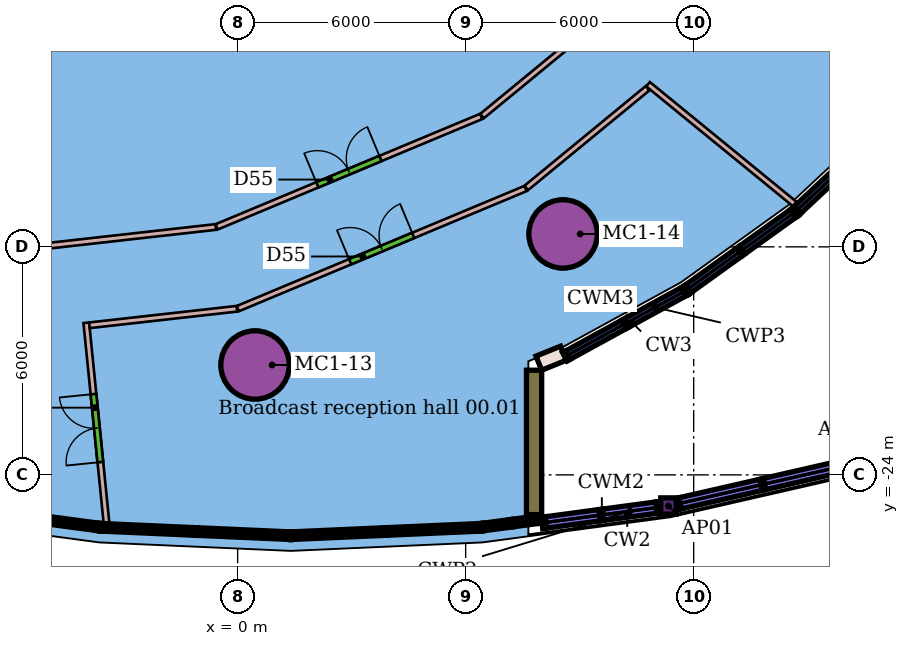
"""IFC4 building model, lengths in metres.
Left out: names, types, materials, properties, quantities, classifications, styles, units other than length and angle.
Written with IfcOpenShell. Run it as: python <this file> out.ifc"""

import sys

from ifc_helpers import new_model, si_unit, direction, frame, frame_2d, origin, origin_2d, place, context, subcontext, project, spatial, rectangle, hollow_circle, i_section, extrude, element, fill, save


model = new_model("IFC4")
c1 = context("Model", 3, precision=1e-05, world=origin(), true_north=direction((0.0, 1.0)))
c2 = subcontext(c1, "Body", "Model", "MODEL_VIEW")
j1 = project(units=[si_unit("LENGTHUNIT", "METRE"), si_unit("PLANEANGLEUNIT", "RADIAN")], contexts=[c1])
p1 = place(None, origin())
s1 = spatial("IfcSite", under=j1, at=p1, CompositionType="ELEMENT")
p2 = place(p1, origin())
s2 = spatial("IfcBuilding", under=s1, at=p2, CompositionType="ELEMENT")
p3 = place(p2, origin())
s3 = spatial("IfcBuildingStorey", under=s2, at=p3, CompositionType="ELEMENT", Elevation=0.0)
for number, where, z_axis, x_axis in (
    (1, (0.458, -21.108, -2.0), (0.0, 0.0, 1.0), (1.0, 0.0, 0.0)),
    (2, (8.563, -17.66, -2.0), (0.0, 0.0, 1.0), (1.0, 0.0, 0.0)),
):
    element("IfcColumn", number, at=place(p3, frame(where, z_axis=z_axis, x_axis=x_axis)), inside=s3, PredefinedType="COLUMN", context=c2, shape_type="SweptSolid", body=[
        extrude(hollow_circle(Radius=0.9, WallThickness=0.06, at=origin_2d()), origin(), (0.0, 0.0, 1.0), 9.8),
    ])
p4 = place(p3, frame((11.337, -24.819, -2.0), z_axis=(0.0, 0.0, 1.0), x_axis=(1.0, 0.0, 0.0)))
e3 = element("IfcColumn", 3, at=p4, inside=s3, PredefinedType="COLUMN", context=c2, shape_type="SweptSolid", body=[
    extrude(i_section(OverallWidth=0.407, OverallDepth=0.428, WebThickness=0.02, FlangeThickness=0.035, at=origin_2d()), origin(), (0.0, 0.0, 1.0), 9.8),
])
p5 = place(p3, frame((-0.553, -17.475, 0.0), z_axis=(0.0, 0.0, 1.0), x_axis=(0.922821127206, 0.38522872061, 0.0)))
e4 = element("IfcWall", 4, at=p5, inside=s3, PredefinedType="PARTITIONING", context=c2, shape_type="SweptSolid", body=[
    extrude(rectangle(XDim=7.545, YDim=0.15, at=frame_2d((3.773, 0.0))), origin(), (0.0, 0.0, 1.0), 7.35),
])
p6 = place(p5, frame((2.873, 0.0, 0.0)))
e5 = element("IfcOpeningElement", 5, at=p6, cuts=e4, PredefinedType="OPENING", context=c2, shape_type="SweptSolid", body=[
    extrude(rectangle(XDim=1.8, YDim=2.4, at=frame_2d((0.9, 1.2))), frame((0.0, 0.085, 0.0), z_axis=(0.0, -1.0, 0.0), x_axis=(1.0, 0.0, 0.0)), (0.0, 0.0, 1.0), 0.17),
])
p7 = place(p3, frame((-7.863, -18.295, 0.0), z_axis=(0.0, 0.0, 1.0), x_axis=(0.993762158865, 0.111520274427, 0.0)))
e6 = element("IfcWall", 6, at=p7, inside=s3, PredefinedType="PARTITIONING", context=c2, shape_type="SweptSolid", body=[
    extrude(rectangle(XDim=7.334, YDim=0.15, at=frame_2d((3.667, 0.0))), origin(), (0.0, 0.0, 1.0), 7.35),
])
p8 = place(p3, frame((6.431, -14.559, 0.0), z_axis=(0.0, 0.0, 1.0), x_axis=(0.772569565922, 0.634930126716, 0.0)))
e7 = element("IfcWall", 7, at=p8, inside=s3, PredefinedType="PARTITIONING", context=c2, shape_type="SweptSolid", body=[
    extrude(rectangle(XDim=8.053, YDim=0.15, at=frame_2d((4.026, 0.0))), origin(), (0.0, 0.0, 1.0), 7.35),
])
p9 = place(p3, frame((-3.449, -25.286, 0.0), z_axis=(0.0, 0.0, 1.0), x_axis=(-0.100367803788, 0.994950402765, 0.0)))
e8 = element("IfcWall", 8, at=p9, inside=s3, PredefinedType="PARTITIONING", context=c2, shape_type="SweptSolid", body=[
    extrude(rectangle(XDim=5.315, YDim=0.15, at=frame_2d((2.657, 0.0))), origin(), (0.0, 0.0, 1.0), 7.35),
])
p10 = place(p9, frame((1.63, 0.0, 0.0)))
e9 = element("IfcOpeningElement", 9, at=p10, cuts=e8, PredefinedType="OPENING", context=c2, shape_type="SweptSolid", body=[
    extrude(rectangle(XDim=1.8, YDim=2.4, at=frame_2d((0.9, 1.2))), frame((0.0, 0.085, 0.0), z_axis=(0.0, -1.0, 0.0), x_axis=(1.0, 0.0, 0.0)), (0.0, 0.0, 1.0), 0.17),
])
p11 = place(p3, frame((-3.9, -20.064, 0.0), z_axis=(0.0, 0.0, 1.0), x_axis=(0.993765031385, 0.111494674297, 0.0)))
e10 = element("IfcWall", 10, at=p11, inside=s3, PredefinedType="PARTITIONING", context=c2, shape_type="SweptSolid", body=[
    extrude(rectangle(XDim=3.906, YDim=0.15, at=frame_2d((1.953, 0.0))), origin(), (0.0, 0.0, 1.0), 7.35),
])
p12 = place(p3, frame((0.004, -19.626, 0.0), z_axis=(0.0, 0.0, 1.0), x_axis=(0.922823237456, 0.385223665436, 0.0)))
e11 = element("IfcWall", 11, at=p12, inside=s3, PredefinedType="PARTITIONING", context=c2, shape_type="SweptSolid", body=[
    extrude(rectangle(XDim=8.207, YDim=0.15, at=frame_2d((4.103, 0.0))), origin(), (0.0, 0.0, 1.0), 7.35),
])
p13 = place(p12, frame((3.203, 0.0, 0.0)))
e12 = element("IfcOpeningElement", 12, at=p13, cuts=e11, PredefinedType="OPENING", context=c2, shape_type="SweptSolid", body=[
    extrude(rectangle(XDim=1.8, YDim=2.4, at=frame_2d((0.9, 1.2))), frame((0.0, 0.085, 0.0), z_axis=(0.0, -1.0, 0.0), x_axis=(1.0, 0.0, 0.0)), (0.0, 0.0, 1.0), 0.17),
])
p14 = place(p3, frame((7.594, -16.45, 0.0), z_axis=(0.0, 0.0, 1.0), x_axis=(0.772605153206, 0.634886822386, 0.0)))
e13 = element("IfcWall", 13, at=p14, inside=s3, PredefinedType="PARTITIONING", context=c2, shape_type="SweptSolid", body=[
    extrude(rectangle(XDim=4.132, YDim=0.15, at=frame_2d((2.066, 0.0))), origin(), (0.0, 0.0, 1.0), 7.35),
])
p15 = place(p3, frame((10.8, -13.721, 0.0), z_axis=(0.0, 0.0, 1.0), x_axis=(0.774493289837, -0.63258212431, 0.0)))
e14 = element("IfcWall", 14, at=p15, inside=s3, PredefinedType="PARTITIONING", context=c2, shape_type="SweptSolid", body=[
    extrude(rectangle(XDim=5.03, YDim=0.15, at=frame_2d((2.515, 0.0))), origin(), (0.0, 0.0, 1.0), 7.35),
])
p16 = place(p3, frame((8.571, -20.8, 0.0), z_axis=(0.0, 0.0, 1.0), x_axis=(-0.927141159757, -0.374712249444, 0.0)))
e15 = element("IfcWall", 15, at=p16, inside=s3, PredefinedType="SOLIDWALL", context=c2, shape_type="SweptSolid", body=[
    extrude(rectangle(XDim=0.697, YDim=0.4, at=frame_2d((0.348, 0.0))), origin(), (0.0, 0.0, 1.0), 7.4),
])
p17 = place(p3, frame((7.8, -21.246, 0.0), z_axis=(0.0, 0.0, 1.0), x_axis=(0.0, -1.0, 0.0)))
e16 = element("IfcWall", 16, at=p17, inside=s3, PredefinedType="SOLIDWALL", context=c2, shape_type="SweptSolid", body=[
    extrude(rectangle(XDim=3.799, YDim=0.4, at=frame_2d((1.9, 0.0))), origin(), (0.0, 0.0, 1.0), 7.8),
])
p18 = place(p6, origin())
e17 = element("IfcDoor", 17, at=p18, inside=s3, OperationType="DOUBLE_DOOR_SINGLE_SWING", PredefinedType="DOOR", context=c2, shape_type="SweptSolid", body=[
    extrude(rectangle(XDim=1.8, YDim=2.4, at=frame_2d((0.9, 1.2))), frame((0.0, 0.025, 0.0), z_axis=(0.0, -1.0, 0.0), x_axis=(1.0, 0.0, 0.0)), (0.0, 0.0, 1.0), 0.05),
])
fill(e5, e17)
p19 = place(p10, origin())
e18 = element("IfcDoor", 18, at=p19, inside=s3, OperationType="DOUBLE_DOOR_SINGLE_SWING", PredefinedType="DOOR", context=c2, shape_type="SweptSolid", body=[
    extrude(rectangle(XDim=1.8, YDim=2.4, at=frame_2d((0.9, 1.2))), frame((0.0, 0.025, 0.0), z_axis=(0.0, -1.0, 0.0), x_axis=(1.0, 0.0, 0.0)), (0.0, 0.0, 1.0), 0.05),
])
fill(e9, e18)
p20 = place(p13, origin())
e19 = element("IfcDoor", 19, at=p20, inside=s3, OperationType="DOUBLE_DOOR_SINGLE_SWING", PredefinedType="DOOR", context=c2, shape_type="SweptSolid", body=[
    extrude(rectangle(XDim=1.8, YDim=2.4, at=frame_2d((0.9, 1.2))), frame((0.0, 0.025, 0.0), z_axis=(0.0, -1.0, 0.0), x_axis=(1.0, 0.0, 0.0)), (0.0, 0.0, 1.0), 0.05),
])
fill(e12, e19)
save(model, sys.argv[1])
